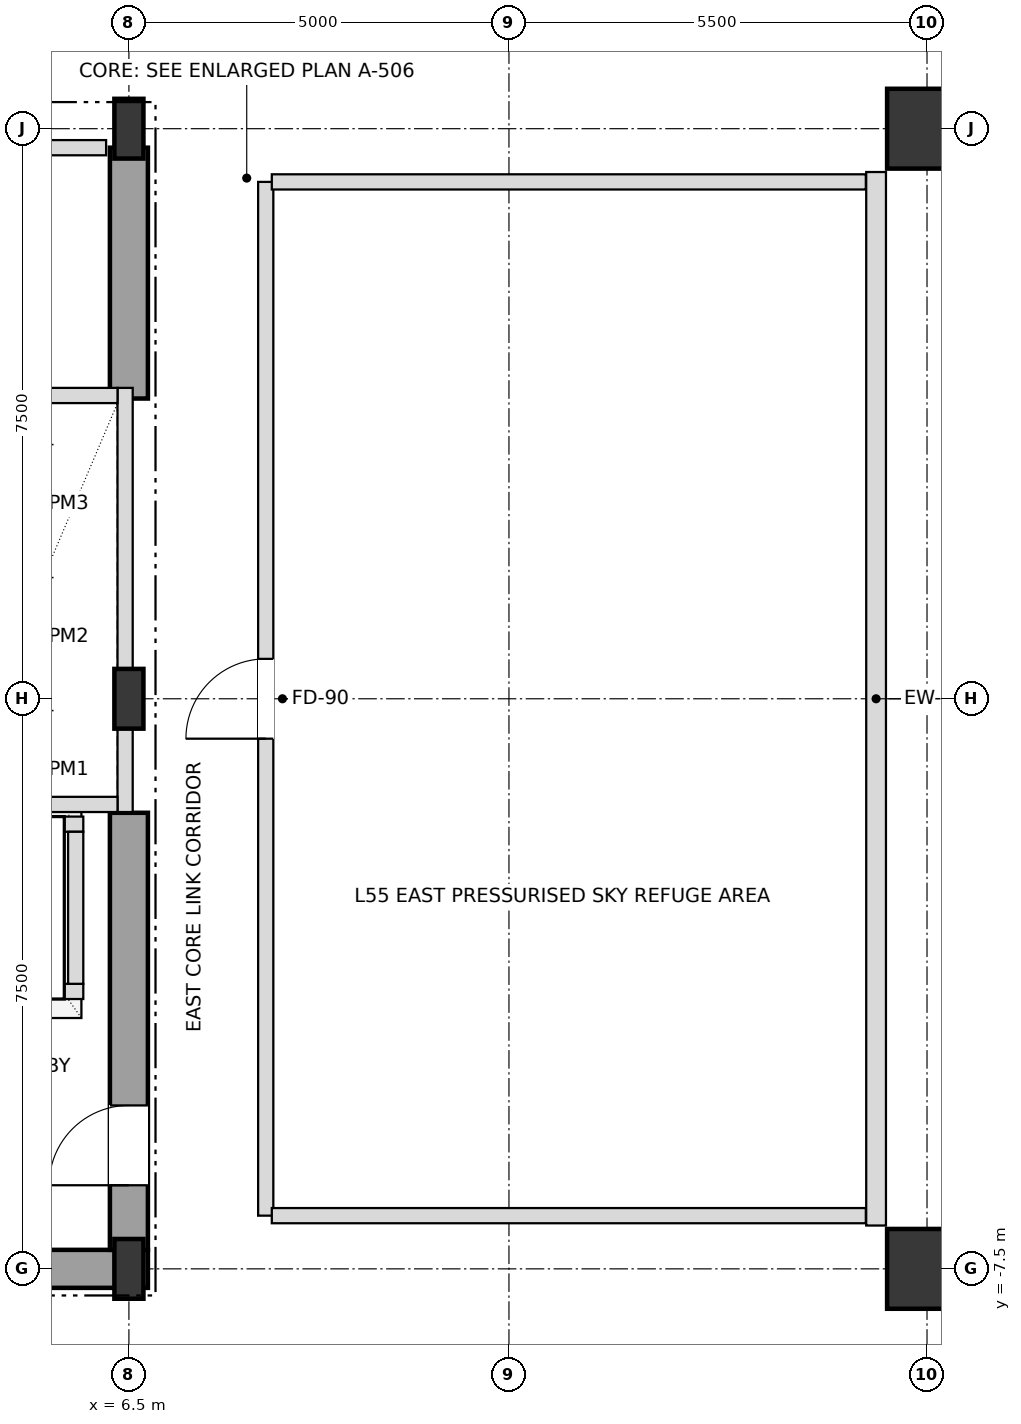
"""IFC4 building model, lengths in metres.
Left out: names, types, materials, properties, quantities, classifications, styles, units other than length and angle.
Written with IfcOpenShell. Run it as: python <this file> out.ifc"""

import sys

from ifc_helpers import new_model, si_unit, direction, frame, frame_2d, origin, origin_2d, place, context, subcontext, project, spatial, rectangle, i_section, extrude, element, fill, save


model = new_model("IFC4")
c1 = context("Model", 3, precision=1e-05, world=origin(), true_north=direction((0.0, 1.0)))
c2 = subcontext(c1, "Body", "Model", "MODEL_VIEW")
j1 = project(units=[si_unit("LENGTHUNIT", "METRE"), si_unit("PLANEANGLEUNIT", "RADIAN")], contexts=[c1])
p1 = place(None, origin())
s1 = spatial("IfcSite", under=j1, at=p1, CompositionType="ELEMENT")
p2 = place(p1, origin())
s2 = spatial("IfcBuilding", under=s1, at=p2, CompositionType="ELEMENT")
p3 = place(p2, frame((0.0, 0.0, 212.4)))
s3 = spatial("IfcBuildingStorey", under=s2, at=p3, CompositionType="ELEMENT", Elevation=212.4)
for number, where, z_axis, x_axis in (
    (1, (6.5, -7.5, 0.0), (0.0, 0.0, 1.0), (1.0, 0.0, 0.0)),
    (2, (6.5, 0.0, 0.0), (0.0, 0.0, 1.0), (1.0, 0.0, 0.0)),
    (3, (6.5, 7.5, 0.0), (0.0, 0.0, 1.0), (1.0, 0.0, 0.0)),
):
    element("IfcColumn", number, at=place(p3, frame(where, z_axis=z_axis, x_axis=x_axis)), inside=s3, PredefinedType="COLUMN", context=c2, shape_type="SweptSolid", body=[
        extrude(i_section(OverallWidth=0.382, OverallDepth=0.786, WebThickness=0.02, FlangeThickness=0.033, at=origin_2d()), origin(), (0.0, 0.0, 1.0), 5.4),
    ])
for number, where, z_axis, x_axis in (
    (4, (17.0, -7.5, 0.0), (0.0, 0.0, 1.0), (1.0, 0.0, 0.0)),
    (5, (17.0, 7.5, 0.0), (0.0, 0.0, 1.0), (1.0, 0.0, 0.0)),
):
    element("IfcColumn", number, at=place(p3, frame(where, z_axis=z_axis, x_axis=x_axis)), inside=s3, PredefinedType="USERDEFINED", context=c2, shape_type="SweptSolid", body=[
        extrude(rectangle(XDim=1.05, YDim=1.05, at=origin_2d()), origin(), (0.0, 0.0, 1.0), 5.4),
    ])
p4 = place(p3, frame((16.33, -6.93, 0.0), z_axis=(0.0, 0.0, 1.0), x_axis=(0.0, 1.0, 0.0)))
e6 = element("IfcWall", 6, at=p4, inside=s3, PredefinedType="SOLIDWALL", context=c2, shape_type="SweptSolid", body=[
    extrude(rectangle(XDim=13.86, YDim=0.26, at=frame_2d((6.93, 0.0))), origin(), (0.0, 0.0, 1.0), 5.1),
])
p5 = place(p3, frame((0.0, -7.5, 0.0), z_axis=(0.0, 0.0, 1.0), x_axis=(1.0, 0.0, 0.0)))
e7 = element("IfcWall", 7, at=p5, inside=s3, PredefinedType="SHEAR", context=c2, shape_type="SweptSolid", body=[
    extrude(rectangle(XDim=6.75, YDim=0.5, at=frame_2d((3.375, 0.0))), origin(), (0.0, 0.0, 1.0), 5.1),
])
p6 = place(p3, frame((6.5, -7.25, 0.0), z_axis=(0.0, 0.0, 1.0), x_axis=(0.0, 1.0, 0.0)))
e8 = element("IfcWall", 8, at=p6, inside=s3, PredefinedType="SHEAR", context=c2, shape_type="SweptSolid", body=[
    extrude(rectangle(XDim=5.75, YDim=0.5, at=frame_2d((2.875, 0.0))), origin(), (0.0, 0.0, 1.0), 5.1),
])
p7 = place(p6, frame((0.85, 0.0, 0.0)))
e9 = element("IfcOpeningElement", 9, at=p7, cuts=e8, PredefinedType="OPENING", context=c2, shape_type="SweptSolid", body=[
    extrude(rectangle(XDim=1.05, YDim=2.15, at=frame_2d((0.525, 1.075))), frame((0.0, 0.26, 0.0), z_axis=(0.0, -1.0, 0.0), x_axis=(1.0, 0.0, 0.0)), (0.0, 0.0, 1.0), 0.52),
])
p8 = place(p3, frame((6.5, 3.95, 0.0), z_axis=(0.0, 0.0, 1.0), x_axis=(0.0, 1.0, 0.0)))
e10 = element("IfcWall", 10, at=p8, inside=s3, PredefinedType="SHEAR", context=c2, shape_type="SweptSolid", body=[
    extrude(rectangle(XDim=3.3, YDim=0.5, at=frame_2d((1.65, 0.0))), origin(), (0.0, 0.0, 1.0), 5.1),
])
p9 = place(p3, frame((6.45, -1.49, 0.0), z_axis=(0.0, 0.0, 1.0), x_axis=(0.0, 1.0, 0.0)))
e11 = element("IfcWall", 11, at=p9, inside=s3, PredefinedType="SOLIDWALL", context=c2, shape_type="SweptSolid", body=[
    extrude(rectangle(XDim=5.58, YDim=0.2, at=frame_2d((2.79, 0.0))), origin(), (0.0, 0.0, 1.0), 4.153),
])
for number, where, z_axis, x_axis in (
    (12, (4.15, -1.39, 0.0), (0.0, 0.0, 1.0), (1.0, 0.0, 0.0)),
    (13, (4.15, 3.99, 0.0), (0.0, 0.0, 1.0), (1.0, 0.0, 0.0)),
):
    element("IfcWall", number, at=place(p3, frame(where, z_axis=z_axis, x_axis=x_axis)), inside=s3, PredefinedType="SOLIDWALL", context=c2, shape_type="SweptSolid", body=[
        extrude(rectangle(XDim=2.2, YDim=0.2, at=frame_2d((1.1, 0.0))), origin(), (0.0, 0.0, 1.0), 5.1),
    ])
p10 = place(p3, frame((1.8, -3.85, 0.0), z_axis=(0.0, 0.0, 1.0), x_axis=(1.0, 0.0, 0.0)))
e14 = element("IfcWall", 14, at=p10, inside=s3, PredefinedType="SOLIDWALL", context=c2, shape_type="SweptSolid", body=[
    extrude(rectangle(XDim=4.1, YDim=0.2, at=frame_2d((2.05, 0.0))), origin(), (0.0, 0.0, 1.0), 5.1),
])
p11 = place(p10, frame((0.45, 0.0, 0.0)))
e15 = element("IfcOpeningElement", 15, at=p11, cuts=e14, PredefinedType="OPENING", context=c2, shape_type="SweptSolid", body=[
    extrude(rectangle(XDim=1.2, YDim=2.2, at=frame_2d((0.6, 1.1))), frame((0.0, 0.11, 0.0), z_axis=(0.0, -1.0, 0.0), x_axis=(1.0, 0.0, 0.0)), (0.0, 0.0, 1.0), 0.22),
])
p12 = place(p10, frame((2.45, 0.0, 0.0)))
e16 = element("IfcOpeningElement", 16, at=p12, cuts=e14, PredefinedType="OPENING", context=c2, shape_type="SweptSolid", body=[
    extrude(rectangle(XDim=1.2, YDim=2.2, at=frame_2d((0.6, 1.1))), frame((0.0, 0.11, 0.0), z_axis=(0.0, -1.0, 0.0), x_axis=(1.0, 0.0, 0.0)), (0.0, 0.0, 1.0), 0.22),
])
p13 = place(p3, frame((1.8, -1.65, 0.0), z_axis=(0.0, 0.0, 1.0), x_axis=(1.0, 0.0, 0.0)))
e17 = element("IfcWall", 17, at=p13, inside=s3, PredefinedType="SOLIDWALL", context=c2, shape_type="SweptSolid", body=[
    extrude(rectangle(XDim=4.1, YDim=0.2, at=frame_2d((2.05, 0.0))), origin(), (0.0, 0.0, 1.0), 5.1),
])
p14 = place(p3, frame((5.8, -3.75, 0.0), z_axis=(0.0, 0.0, 1.0), x_axis=(0.0, 1.0, 0.0)))
e18 = element("IfcWall", 18, at=p14, inside=s3, PredefinedType="SOLIDWALL", context=c2, shape_type="SweptSolid", body=[
    extrude(rectangle(XDim=2.0, YDim=0.2, at=frame_2d((1.0, 0.0))), origin(), (0.0, 0.0, 1.0), 5.1),
])
p15 = place(p3, frame((8.3, -6.8, 0.0), z_axis=(0.0, 0.0, 1.0), x_axis=(0.0, 1.0, 0.0)))
e19 = element("IfcWall", 19, at=p15, inside=s3, PredefinedType="SOLIDWALL", context=c2, shape_type="SweptSolid", body=[
    extrude(rectangle(XDim=13.6, YDim=0.2, at=frame_2d((6.8, 0.0))), origin(), (0.0, 0.0, 1.0), 5.1),
])
p16 = place(p15, frame((6.275, 0.0, 0.0)))
e20 = element("IfcOpeningElement", 20, at=p16, cuts=e19, PredefinedType="OPENING", context=c2, shape_type="SweptSolid", body=[
    extrude(rectangle(XDim=1.05, YDim=2.15, at=frame_2d((0.525, 1.075))), frame((0.0, 0.11, 0.0), z_axis=(0.0, -1.0, 0.0), x_axis=(1.0, 0.0, 0.0)), (0.0, 0.0, 1.0), 0.22),
])
for number, where, z_axis, x_axis in (
    (21, (8.38, -6.8, 0.0), (0.0, 0.0, 1.0), (1.0, 0.0, 0.0)),
    (22, (8.38, 6.8, 0.0), (0.0, 0.0, 1.0), (1.0, 0.0, 0.0)),
):
    element("IfcWall", number, at=place(p3, frame(where, z_axis=z_axis, x_axis=x_axis)), inside=s3, PredefinedType="SOLIDWALL", context=c2, shape_type="SweptSolid", body=[
        extrude(rectangle(XDim=7.815, YDim=0.2, at=frame_2d((3.908, 0.0))), origin(), (0.0, 0.0, 1.0), 4.738),
    ])
p17 = place(p3, frame((4.13, 7.25, 0.0), z_axis=(0.0, 0.0, 1.0), x_axis=(1.0, 0.0, 0.0)))
e23 = element("IfcWall", 23, at=p17, inside=s3, PredefinedType="SOLIDWALL", context=c2, shape_type="SweptSolid", body=[
    extrude(rectangle(XDim=2.07, YDim=0.2, at=frame_2d((1.035, 0.0))), origin(), (0.0, 0.0, 1.0), 4.153),
])
p18 = place(p7, origin())
e24 = element("IfcDoor", 24, at=p18, inside=s3, OperationType="SINGLE_SWING_LEFT", PredefinedType="DOOR", context=c2, shape_type="SweptSolid", body=[
    extrude(rectangle(XDim=1.05, YDim=2.15, at=frame_2d((0.525, 1.075))), frame((0.0, 0.025, 0.0), z_axis=(0.0, -1.0, 0.0), x_axis=(1.0, 0.0, 0.0)), (0.0, 0.0, 1.0), 0.05),
])
fill(e9, e24)
p19 = place(p16, origin())
e25 = element("IfcDoor", 25, at=p19, inside=s3, OperationType="SINGLE_SWING_LEFT", PredefinedType="DOOR", context=c2, shape_type="SweptSolid", body=[
    extrude(rectangle(XDim=1.05, YDim=2.15, at=frame_2d((0.525, 1.075))), frame((0.0, 0.025, 0.0), z_axis=(0.0, -1.0, 0.0), x_axis=(1.0, 0.0, 0.0)), (0.0, 0.0, 1.0), 0.05),
])
fill(e20, e25)
save(model, sys.argv[1])
